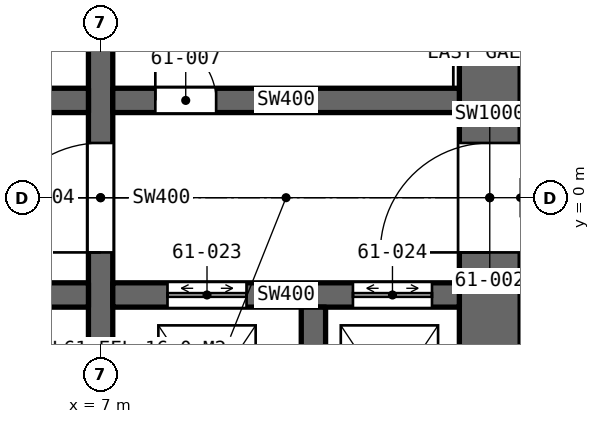
"""IFC4 building model, lengths in metres.
Left out: names, types, materials, properties, quantities, classifications, styles, units other than length and angle.
Written with IfcOpenShell. Run it as: python <this file> out.ifc"""

import sys

from ifc_helpers import new_model, si_unit, direction, frame, frame_2d, origin, place, context, subcontext, project, spatial, rectangle, extrude, element, fill, save


model = new_model("IFC4")
c1 = context("Model", 3, precision=1e-05, world=origin(), true_north=direction((0.0, 1.0)))
c2 = subcontext(c1, "Body", "Model", "MODEL_VIEW")
j1 = project(units=[si_unit("LENGTHUNIT", "METRE"), si_unit("PLANEANGLEUNIT", "RADIAN")], contexts=[c1])
p1 = place(None, origin())
s1 = spatial("IfcSite", under=j1, at=p1, CompositionType="ELEMENT")
p2 = place(p1, origin())
s2 = spatial("IfcBuilding", under=s1, at=p2, CompositionType="ELEMENT")
p3 = place(p2, frame((0.0, 0.0, 275.4)))
s3 = spatial("IfcBuildingStorey", under=s2, at=p3, CompositionType="ELEMENT", Elevation=275.4)
p4 = place(p3, frame((13.4, -8.9, 0.0), z_axis=(0.0, 0.0, 1.0), x_axis=(0.0, 1.0, 0.0)))
e1 = element("IfcWall", 1, at=p4, inside=s3, PredefinedType="SHEAR", context=c2, shape_type="SweptSolid", body=[
    extrude(rectangle(XDim=17.8, YDim=1.0, at=frame_2d((8.9, 0.0))), origin(), (0.0, 0.0, 1.0), 4.2),
])
p5 = place(p4, frame((8.0, 0.0, 0.0)))
e2 = element("IfcOpeningElement", 2, at=p5, cuts=e1, PredefinedType="OPENING", context=c2, shape_type="SweptSolid", body=[
    extrude(rectangle(XDim=1.8, YDim=2.4, at=frame_2d((0.9, 1.2))), frame((0.0, 0.51, 0.0), z_axis=(0.0, -1.0, 0.0), x_axis=(1.0, 0.0, 0.0)), (0.0, 0.0, 1.0), 1.02),
])
p6 = place(p3, frame((7.0, -8.9, 0.0), z_axis=(0.0, 0.0, 1.0), x_axis=(0.0, 1.0, 0.0)))
e3 = element("IfcWall", 3, at=p6, inside=s3, PredefinedType="SHEAR", context=c2, shape_type="SweptSolid", body=[
    extrude(rectangle(XDim=17.8, YDim=0.4, at=frame_2d((8.9, 0.0))), origin(), (0.0, 0.0, 1.0), 4.2),
])
p7 = place(p6, frame((8.0, 0.0, 0.0)))
e4 = element("IfcOpeningElement", 4, at=p7, cuts=e3, PredefinedType="OPENING", context=c2, shape_type="SweptSolid", body=[
    extrude(rectangle(XDim=1.8, YDim=2.4, at=frame_2d((0.9, 1.2))), frame((0.0, 0.21, 0.0), z_axis=(0.0, -1.0, 0.0), x_axis=(1.0, 0.0, 0.0)), (0.0, 0.0, 1.0), 0.42),
])
p8 = place(p3, frame((-6.8, 1.6, 0.0), z_axis=(0.0, 0.0, 1.0), x_axis=(1.0, 0.0, 0.0)))
e5 = element("IfcWall", 5, at=p8, inside=s3, PredefinedType="SHEAR", context=c2, shape_type="SweptSolid", body=[
    extrude(rectangle(XDim=13.6, YDim=0.4, at=frame_2d((6.8, 0.0))), origin(), (0.0, 0.0, 1.0), 4.2),
])
p9 = place(p8, frame((1.365, 0.0, 0.0)))
e6 = element("IfcOpeningElement", 6, at=p9, cuts=e5, PredefinedType="OPENING", context=c2, shape_type="SweptSolid", body=[
    extrude(rectangle(XDim=1.0, YDim=2.4, at=frame_2d((0.5, 1.2))), frame((0.0, 0.21, 0.0), z_axis=(0.0, -1.0, 0.0), x_axis=(1.0, 0.0, 0.0)), (0.0, 0.0, 1.0), 0.42),
])
p10 = place(p8, frame((5.1, 0.0, 0.0)))
e7 = element("IfcOpeningElement", 7, at=p10, cuts=e5, PredefinedType="OPENING", context=c2, shape_type="SweptSolid", body=[
    extrude(rectangle(XDim=1.0, YDim=2.4, at=frame_2d((0.5, 1.2))), frame((0.0, 0.21, 0.0), z_axis=(0.0, -1.0, 0.0), x_axis=(1.0, 0.0, 0.0)), (0.0, 0.0, 1.0), 0.42),
])
p11 = place(p8, frame((8.635, 0.0, 0.0)))
e8 = element("IfcOpeningElement", 8, at=p11, cuts=e5, PredefinedType="OPENING", context=c2, shape_type="SweptSolid", body=[
    extrude(rectangle(XDim=1.0, YDim=2.4, at=frame_2d((0.5, 1.2))), frame((0.0, 0.21, 0.0), z_axis=(0.0, -1.0, 0.0), x_axis=(1.0, 0.0, 0.0)), (0.0, 0.0, 1.0), 0.42),
])
p12 = place(p8, frame((11.95, 0.0, 0.0)))
e9 = element("IfcOpeningElement", 9, at=p12, cuts=e5, PredefinedType="OPENING", context=c2, shape_type="SweptSolid", body=[
    extrude(rectangle(XDim=0.9, YDim=2.4, at=frame_2d((0.45, 1.2))), frame((0.0, 0.21, 0.0), z_axis=(0.0, -1.0, 0.0), x_axis=(1.0, 0.0, 0.0)), (0.0, 0.0, 1.0), 0.42),
])
p13 = place(p3, frame((-6.8, -1.6, 0.0), z_axis=(0.0, 0.0, 1.0), x_axis=(1.0, 0.0, 0.0)))
e10 = element("IfcWall", 10, at=p13, inside=s3, PredefinedType="SHEAR", context=c2, shape_type="SweptSolid", body=[
    extrude(rectangle(XDim=13.6, YDim=0.4, at=frame_2d((6.8, 0.0))), origin(), (0.0, 0.0, 1.0), 4.2),
])
p14 = place(p13, frame((11.9, 0.0, 0.0)))
e11 = element("IfcOpeningElement", 11, at=p14, cuts=e10, PredefinedType="OPENING", context=c2, shape_type="SweptSolid", body=[
    extrude(rectangle(XDim=1.0, YDim=2.4, at=frame_2d((0.5, 1.2))), frame((0.0, 0.21, 0.0), z_axis=(0.0, -1.0, 0.0), x_axis=(1.0, 0.0, 0.0)), (0.0, 0.0, 1.0), 0.42),
])
p15 = place(p13, frame((4.5, 0.0, 0.0)))
e12 = element("IfcOpeningElement", 12, at=p15, cuts=e10, PredefinedType="OPENING", context=c2, shape_type="SweptSolid", body=[
    extrude(rectangle(XDim=1.8, YDim=2.4, at=frame_2d((0.9, 1.2))), frame((0.0, 0.21, 0.0), z_axis=(0.0, -1.0, 0.0), x_axis=(1.0, 0.0, 0.0)), (0.0, 0.0, 1.0), 0.42),
])
p16 = place(p3, frame((7.2, 1.6, 0.0), z_axis=(0.0, 0.0, 1.0), x_axis=(1.0, 0.0, 0.0)))
e13 = element("IfcWall", 13, at=p16, inside=s3, PredefinedType="SHEAR", context=c2, shape_type="SweptSolid", body=[
    extrude(rectangle(XDim=5.7, YDim=0.4, at=frame_2d((2.85, 0.0))), origin(), (0.0, 0.0, 1.0), 4.2),
])
p17 = place(p16, frame((0.7, 0.0, 0.0)))
e14 = element("IfcOpeningElement", 14, at=p17, cuts=e13, PredefinedType="OPENING", context=c2, shape_type="SweptSolid", body=[
    extrude(rectangle(XDim=1.0, YDim=2.4, at=frame_2d((0.5, 1.2))), frame((0.0, 0.21, 0.0), z_axis=(0.0, -1.0, 0.0), x_axis=(1.0, 0.0, 0.0)), (0.0, 0.0, 1.0), 0.42),
])
p18 = place(p3, frame((7.2, -1.6, 0.0), z_axis=(0.0, 0.0, 1.0), x_axis=(1.0, 0.0, 0.0)))
e15 = element("IfcWall", 15, at=p18, inside=s3, PredefinedType="SHEAR", context=c2, shape_type="SweptSolid", body=[
    extrude(rectangle(XDim=5.7, YDim=0.4, at=frame_2d((2.85, 0.0))), origin(), (0.0, 0.0, 1.0), 4.2),
])
p19 = place(p18, frame((0.9, 0.0, 0.0)))
e16 = element("IfcOpeningElement", 16, at=p19, cuts=e15, PredefinedType="OPENING", context=c2, shape_type="SweptSolid", body=[
    extrude(rectangle(XDim=1.3, YDim=2.4, at=frame_2d((0.65, 1.2))), frame((0.0, 0.21, 0.0), z_axis=(0.0, -1.0, 0.0), x_axis=(1.0, 0.0, 0.0)), (0.0, 0.0, 1.0), 0.42),
])
p20 = place(p18, frame((3.95, 0.0, 0.0)))
e17 = element("IfcOpeningElement", 17, at=p20, cuts=e15, PredefinedType="OPENING", context=c2, shape_type="SweptSolid", body=[
    extrude(rectangle(XDim=1.3, YDim=2.4, at=frame_2d((0.65, 1.2))), frame((0.0, 0.21, 0.0), z_axis=(0.0, -1.0, 0.0), x_axis=(1.0, 0.0, 0.0)), (0.0, 0.0, 1.0), 0.42),
])
p21 = place(p3, frame((10.5, -4.8, 0.0), z_axis=(0.0, 0.0, 1.0), x_axis=(0.0, 1.0, 0.0)))
e18 = element("IfcWall", 18, at=p21, inside=s3, PredefinedType="SHEAR", context=c2, shape_type="SweptSolid", body=[
    extrude(rectangle(XDim=3.0, YDim=0.4, at=frame_2d((1.5, 0.0))), origin(), (0.0, 0.0, 1.0), 4.2),
])
p22 = place(p5, origin())
e19 = element("IfcDoor", 19, at=p22, inside=s3, OperationType="DOUBLE_DOOR_SINGLE_SWING", PredefinedType="DOOR", context=c2, shape_type="SweptSolid", body=[
    extrude(rectangle(XDim=1.8, YDim=2.4, at=frame_2d((0.9, 1.2))), frame((0.0, 0.025, 0.0), z_axis=(0.0, -1.0, 0.0), x_axis=(1.0, 0.0, 0.0)), (0.0, 0.0, 1.0), 0.05),
])
fill(e2, e19)
p23 = place(p7, origin())
e20 = element("IfcDoor", 20, at=p23, inside=s3, OperationType="DOUBLE_DOOR_SINGLE_SWING", PredefinedType="DOOR", context=c2, shape_type="SweptSolid", body=[
    extrude(rectangle(XDim=1.8, YDim=2.4, at=frame_2d((0.9, 1.2))), frame((0.0, 0.025, 0.0), z_axis=(0.0, -1.0, 0.0), x_axis=(1.0, 0.0, 0.0)), (0.0, 0.0, 1.0), 0.05),
])
fill(e4, e20)
p24 = place(p17, origin())
e21 = element("IfcDoor", 21, at=p24, inside=s3, OperationType="SINGLE_SWING_LEFT", PredefinedType="DOOR", context=c2, shape_type="SweptSolid", body=[
    extrude(rectangle(XDim=1.0, YDim=2.4, at=frame_2d((0.5, 1.2))), frame((0.0, 0.025, 0.0), z_axis=(0.0, -1.0, 0.0), x_axis=(1.0, 0.0, 0.0)), (0.0, 0.0, 1.0), 0.05),
])
fill(e14, e21)
p25 = place(p19, origin())
e22 = element("IfcDoor", 22, at=p25, inside=s3, OperationType="DOUBLE_DOOR_SLIDING", PredefinedType="DOOR", context=c2, shape_type="SweptSolid", body=[
    extrude(rectangle(XDim=1.3, YDim=2.4, at=frame_2d((0.65, 1.2))), frame((0.0, 0.025, 0.0), z_axis=(0.0, -1.0, 0.0), x_axis=(1.0, 0.0, 0.0)), (0.0, 0.0, 1.0), 0.05),
])
fill(e16, e22)
p26 = place(p20, origin())
e23 = element("IfcDoor", 23, at=p26, inside=s3, OperationType="DOUBLE_DOOR_SLIDING", PredefinedType="DOOR", context=c2, shape_type="SweptSolid", body=[
    extrude(rectangle(XDim=1.3, YDim=2.4, at=frame_2d((0.65, 1.2))), frame((0.0, 0.025, 0.0), z_axis=(0.0, -1.0, 0.0), x_axis=(1.0, 0.0, 0.0)), (0.0, 0.0, 1.0), 0.05),
])
fill(e17, e23)
save(model, sys.argv[1])
